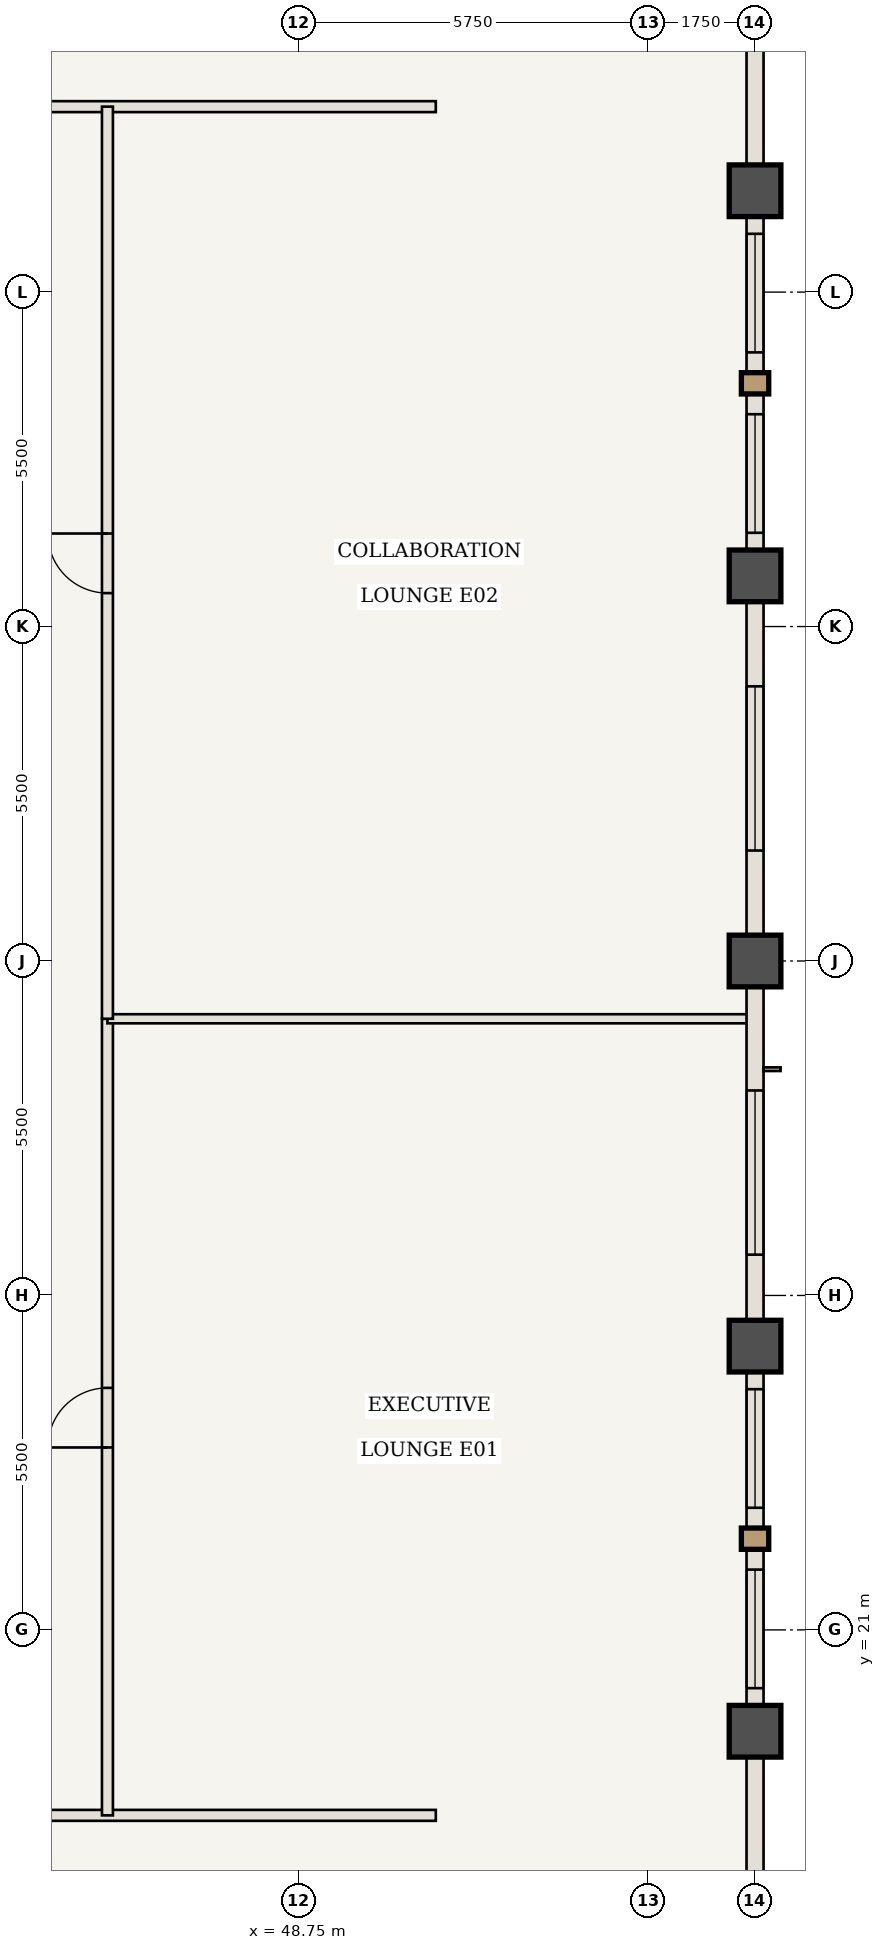
"""IFC4 building model, lengths in metres.
Left out: names, types, materials, properties, quantities, classifications, styles, units other than length and angle.
Written with IfcOpenShell. Run it as: python <this file> out.ifc"""

import sys

from ifc_helpers import new_model, si_unit, direction, frame, frame_2d, origin, origin_2d, place, context, subcontext, project, spatial, rectangle, extrude, element, fill, save


model = new_model("IFC4")
c1 = context("Model", 3, precision=1e-05, world=origin(), true_north=direction((0.0, 1.0)))
c2 = subcontext(c1, "Body", "Model", "MODEL_VIEW")
j1 = project(units=[si_unit("LENGTHUNIT", "METRE"), si_unit("PLANEANGLEUNIT", "RADIAN")], contexts=[c1])
p1 = place(None, origin())
s1 = spatial("IfcSite", under=j1, at=p1, CompositionType="ELEMENT")
p2 = place(p1, origin())
s2 = spatial("IfcBuilding", under=s1, at=p2, CompositionType="ELEMENT")
p3 = place(p2, frame((0.0, 0.0, 229.25)))
s3 = spatial("IfcBuildingStorey", under=s2, at=p3, CompositionType="ELEMENT", Elevation=229.25)
for number, where, z_axis, x_axis in (
    (1, (56.25, 19.333, 0.0), (0.0, 0.0, 1.0), (1.0, 0.0, 0.0)),
    (2, (56.25, 25.667, 0.0), (0.0, 0.0, 1.0), (1.0, 0.0, 0.0)),
    (3, (56.25, 32.0, 0.0), (0.0, 0.0, 1.0), (1.0, 0.0, 0.0)),
    (4, (56.25, 38.333, 0.0), (0.0, 0.0, 1.0), (1.0, 0.0, 0.0)),
    (5, (56.25, 44.667, 0.0), (0.0, 0.0, 1.0), (1.0, 0.0, 0.0)),
):
    element("IfcColumn", number, at=place(p3, frame(where, z_axis=z_axis, x_axis=x_axis)), inside=s3, PredefinedType="COLUMN", context=c2, shape_type="SweptSolid", body=[
        extrude(rectangle(XDim=0.85, YDim=0.85, at=origin_2d()), origin(), (0.0, 0.0, 1.0), 3.85),
    ])
p4 = place(p3, frame((39.258, 17.95, 0.0), z_axis=(0.0, 0.0, 1.0), x_axis=(1.0, 0.0, 0.0)))
e6 = element("IfcWall", 6, at=p4, inside=s3, PredefinedType="STANDARD", context=c2, shape_type="SweptSolid", body=[
    extrude(rectangle(XDim=11.742, YDim=0.18, at=frame_2d((5.871, 0.0))), origin(), (0.0, 0.0, 1.0), 3.685),
])
p5 = place(p4, frame((1.196, 0.0, 0.0)))
e7 = element("IfcOpeningElement", 7, at=p5, cuts=e6, PredefinedType="OPENING", context=c2, shape_type="SweptSolid", body=[
    extrude(rectangle(XDim=0.98, YDim=2.2, at=frame_2d((0.49, 1.1))), frame((0.0, 0.1, 0.0), z_axis=(0.0, -1.0, 0.0), x_axis=(1.0, 0.0, 0.0)), (0.0, 0.0, 1.0), 0.2),
])
p6 = place(p3, frame((13.0, 46.05, 0.0), z_axis=(0.0, 0.0, 1.0), x_axis=(1.0, 0.0, 0.0)))
e8 = element("IfcWall", 8, at=p6, inside=s3, PredefinedType="STANDARD", context=c2, shape_type="SweptSolid", body=[
    extrude(rectangle(XDim=38.0, YDim=0.18, at=frame_2d((19.0, 0.0))), origin(), (0.0, 0.0, 1.0), 3.685),
])
p7 = place(p6, frame((19.7, 0.0, 0.0)))
e9 = element("IfcOpeningElement", 9, at=p7, cuts=e8, PredefinedType="OPENING", context=c2, shape_type="SweptSolid", body=[
    extrude(rectangle(XDim=0.98, YDim=2.2, at=frame_2d((0.49, 1.1))), frame((0.0, 0.1, 0.0), z_axis=(0.0, -1.0, 0.0), x_axis=(1.0, 0.0, 0.0)), (0.0, 0.0, 1.0), 0.2),
])
p8 = place(p3, frame((45.6, 17.95, 0.0), z_axis=(0.0, 0.0, 1.0), x_axis=(0.0, 1.0, 0.0)))
e10 = element("IfcWall", 10, at=p8, inside=s3, PredefinedType="STANDARD", context=c2, shape_type="SweptSolid", body=[
    extrude(rectangle(XDim=13.1, YDim=0.18, at=frame_2d((6.55, 0.0))), origin(), (0.0, 0.0, 1.0), 3.685),
])
p9 = place(p8, frame((6.05, 0.0, 0.0)))
e11 = element("IfcOpeningElement", 11, at=p9, cuts=e10, PredefinedType="OPENING", context=c2, shape_type="SweptSolid", body=[
    extrude(rectangle(XDim=0.98, YDim=2.2, at=frame_2d((0.49, 1.1))), frame((0.0, 0.1, 0.0), z_axis=(0.0, -1.0, 0.0), x_axis=(1.0, 0.0, 0.0)), (0.0, 0.0, 1.0), 0.2),
])
p10 = place(p3, frame((45.6, 31.05, 0.0), z_axis=(0.0, 0.0, 1.0), x_axis=(1.0, 0.0, 0.0)))
e12 = element("IfcWall", 12, at=p10, inside=s3, PredefinedType="STANDARD", context=c2, shape_type="SweptSolid", body=[
    extrude(rectangle(XDim=10.59, YDim=0.15, at=frame_2d((5.295, 0.0))), origin(), (0.0, 0.0, 1.0), 3.685),
])
p11 = place(p3, frame((45.6, 31.05, 0.0), z_axis=(0.0, 0.0, 1.0), x_axis=(0.0, 1.0, 0.0)))
e13 = element("IfcWall", 13, at=p11, inside=s3, PredefinedType="STANDARD", context=c2, shape_type="SweptSolid", body=[
    extrude(rectangle(XDim=15.0, YDim=0.18, at=frame_2d((7.5, 0.0))), origin(), (0.0, 0.0, 1.0), 3.685),
])
p12 = place(p11, frame((7.0, 0.0, 0.0)))
e14 = element("IfcOpeningElement", 14, at=p12, cuts=e13, PredefinedType="OPENING", context=c2, shape_type="SweptSolid", body=[
    extrude(rectangle(XDim=0.98, YDim=2.2, at=frame_2d((0.49, 1.1))), frame((0.0, 0.1, 0.0), z_axis=(0.0, -1.0, 0.0), x_axis=(1.0, 0.0, 0.0)), (0.0, 0.0, 1.0), 0.2),
])
p13 = place(p3, frame((56.25, 19.333, 0.0), z_axis=(0.0, 0.0, 1.0), x_axis=(0.0, -1.0, 0.0)))
e15 = element("IfcWall", 15, at=p13, inside=s3, PredefinedType="USERDEFINED", context=c2, shape_type="SweptSolid", body=[
    extrude(rectangle(XDim=6.333, YDim=0.28, at=frame_2d((3.167, 0.0))), origin(), (0.0, 0.0, 1.0), 2.985),
])
p14 = place(p3, frame((56.25, 25.667, 0.0), z_axis=(0.0, 0.0, 1.0), x_axis=(0.0, -1.0, 0.0)))
e16 = element("IfcWall", 16, at=p14, inside=s3, PredefinedType="USERDEFINED", context=c2, shape_type="SweptSolid", body=[
    extrude(rectangle(XDim=6.333, YDim=0.28, at=frame_2d((3.167, 0.0))), origin(), (0.0, 0.0, 1.0), 2.985),
])
p15 = place(p14, frame((0.708, 0.0, 0.85)))
e17 = element("IfcOpeningElement", 17, at=p15, cuts=e16, PredefinedType="OPENING", context=c2, shape_type="SweptSolid", body=[
    extrude(rectangle(XDim=1.95, YDim=1.935, at=frame_2d((0.975, 0.968))), frame((0.0, 0.15, 0.0), z_axis=(0.0, -1.0, 0.0), x_axis=(1.0, 0.0, 0.0)), (0.0, 0.0, 1.0), 0.3),
])
p16 = place(p14, frame((3.675, 0.0, 0.85)))
e18 = element("IfcOpeningElement", 18, at=p16, cuts=e16, PredefinedType="OPENING", context=c2, shape_type="SweptSolid", body=[
    extrude(rectangle(XDim=1.95, YDim=1.935, at=frame_2d((0.975, 0.968))), frame((0.0, 0.15, 0.0), z_axis=(0.0, -1.0, 0.0), x_axis=(1.0, 0.0, 0.0)), (0.0, 0.0, 1.0), 0.3),
])
p17 = place(p3, frame((56.25, 32.0, 0.0), z_axis=(0.0, 0.0, 1.0), x_axis=(0.0, -1.0, 0.0)))
e19 = element("IfcWall", 19, at=p17, inside=s3, PredefinedType="USERDEFINED", context=c2, shape_type="SweptSolid", body=[
    extrude(rectangle(XDim=6.333, YDim=0.28, at=frame_2d((3.167, 0.0))), origin(), (0.0, 0.0, 1.0), 2.985),
])
p18 = place(p17, frame((2.129, 0.0, 0.85)))
e20 = element("IfcOpeningElement", 20, at=p18, cuts=e19, PredefinedType="OPENING", context=c2, shape_type="SweptSolid", body=[
    extrude(rectangle(XDim=2.7, YDim=1.935, at=frame_2d((1.35, 0.968))), frame((0.0, 0.15, 0.0), z_axis=(0.0, -1.0, 0.0), x_axis=(1.0, 0.0, 0.0)), (0.0, 0.0, 1.0), 0.3),
])
p19 = place(p3, frame((56.25, 38.333, 0.0), z_axis=(0.0, 0.0, 1.0), x_axis=(0.0, -1.0, 0.0)))
e21 = element("IfcWall", 21, at=p19, inside=s3, PredefinedType="USERDEFINED", context=c2, shape_type="SweptSolid", body=[
    extrude(rectangle(XDim=6.333, YDim=0.28, at=frame_2d((3.167, 0.0))), origin(), (0.0, 0.0, 1.0), 2.985),
])
p20 = place(p19, frame((1.817, 0.0, 0.85)))
e22 = element("IfcOpeningElement", 22, at=p20, cuts=e21, PredefinedType="OPENING", context=c2, shape_type="SweptSolid", body=[
    extrude(rectangle(XDim=2.7, YDim=1.935, at=frame_2d((1.35, 0.968))), frame((0.0, 0.15, 0.0), z_axis=(0.0, -1.0, 0.0), x_axis=(1.0, 0.0, 0.0)), (0.0, 0.0, 1.0), 0.3),
])
p21 = place(p3, frame((56.25, 44.667, 0.0), z_axis=(0.0, 0.0, 1.0), x_axis=(0.0, -1.0, 0.0)))
e23 = element("IfcWall", 23, at=p21, inside=s3, PredefinedType="USERDEFINED", context=c2, shape_type="SweptSolid", body=[
    extrude(rectangle(XDim=6.333, YDim=0.28, at=frame_2d((3.167, 0.0))), origin(), (0.0, 0.0, 1.0), 2.985),
])
p22 = place(p21, frame((0.708, 0.0, 0.85)))
e24 = element("IfcOpeningElement", 24, at=p22, cuts=e23, PredefinedType="OPENING", context=c2, shape_type="SweptSolid", body=[
    extrude(rectangle(XDim=1.95, YDim=1.935, at=frame_2d((0.975, 0.968))), frame((0.0, 0.15, 0.0), z_axis=(0.0, -1.0, 0.0), x_axis=(1.0, 0.0, 0.0)), (0.0, 0.0, 1.0), 0.3),
])
p23 = place(p21, frame((3.675, 0.0, 0.85)))
e25 = element("IfcOpeningElement", 25, at=p23, cuts=e23, PredefinedType="OPENING", context=c2, shape_type="SweptSolid", body=[
    extrude(rectangle(XDim=1.95, YDim=1.935, at=frame_2d((0.975, 0.968))), frame((0.0, 0.15, 0.0), z_axis=(0.0, -1.0, 0.0), x_axis=(1.0, 0.0, 0.0)), (0.0, 0.0, 1.0), 0.3),
])
p24 = place(p3, frame((56.25, 51.0, 0.0), z_axis=(0.0, 0.0, 1.0), x_axis=(0.0, -1.0, 0.0)))
e26 = element("IfcWall", 26, at=p24, inside=s3, PredefinedType="USERDEFINED", context=c2, shape_type="SweptSolid", body=[
    extrude(rectangle(XDim=6.333, YDim=0.28, at=frame_2d((3.167, 0.0))), origin(), (0.0, 0.0, 1.0), 2.985),
])
p25 = place(p9, origin())
e27 = element("IfcDoor", 27, at=p25, inside=s3, OperationType="SINGLE_SWING_LEFT", PredefinedType="DOOR", context=c2, shape_type="SweptSolid", body=[
    extrude(rectangle(XDim=0.98, YDim=2.2, at=frame_2d((0.49, 1.1))), frame((0.0, 0.025, 0.0), z_axis=(0.0, -1.0, 0.0), x_axis=(1.0, 0.0, 0.0)), (0.0, 0.0, 1.0), 0.05),
])
fill(e11, e27)
p26 = place(p12, origin())
e28 = element("IfcDoor", 28, at=p26, inside=s3, OperationType="SINGLE_SWING_RIGHT", PredefinedType="DOOR", context=c2, shape_type="SweptSolid", body=[
    extrude(rectangle(XDim=0.98, YDim=2.2, at=frame_2d((0.49, 1.1))), frame((0.0, 0.025, 0.0), z_axis=(0.0, -1.0, 0.0), x_axis=(1.0, 0.0, 0.0)), (0.0, 0.0, 1.0), 0.05),
])
fill(e14, e28)
p27 = place(p15, origin())
e29 = element("IfcWindow", 29, at=p27, inside=s3, PartitioningType="SINGLE_PANEL", PredefinedType="WINDOW", context=c2, shape_type="SweptSolid", body=[
    extrude(rectangle(XDim=1.95, YDim=1.935, at=frame_2d((0.975, 0.968))), frame((0.0, 0.03, 0.0), z_axis=(0.0, -1.0, 0.0), x_axis=(1.0, 0.0, 0.0)), (0.0, 0.0, 1.0), 0.06),
])
fill(e17, e29)
p28 = place(p16, origin())
e30 = element("IfcWindow", 30, at=p28, inside=s3, PartitioningType="SINGLE_PANEL", PredefinedType="WINDOW", context=c2, shape_type="SweptSolid", body=[
    extrude(rectangle(XDim=1.95, YDim=1.935, at=frame_2d((0.975, 0.968))), frame((0.0, 0.03, 0.0), z_axis=(0.0, -1.0, 0.0), x_axis=(1.0, 0.0, 0.0)), (0.0, 0.0, 1.0), 0.06),
])
fill(e18, e30)
p29 = place(p18, origin())
e31 = element("IfcWindow", 31, at=p29, inside=s3, PartitioningType="SINGLE_PANEL", PredefinedType="WINDOW", context=c2, shape_type="SweptSolid", body=[
    extrude(rectangle(XDim=2.7, YDim=1.935, at=frame_2d((1.35, 0.968))), frame((0.0, 0.03, 0.0), z_axis=(0.0, -1.0, 0.0), x_axis=(1.0, 0.0, 0.0)), (0.0, 0.0, 1.0), 0.06),
])
fill(e20, e31)
p30 = place(p20, origin())
e32 = element("IfcWindow", 32, at=p30, inside=s3, PartitioningType="SINGLE_PANEL", PredefinedType="WINDOW", context=c2, shape_type="SweptSolid", body=[
    extrude(rectangle(XDim=2.7, YDim=1.935, at=frame_2d((1.35, 0.968))), frame((0.0, 0.03, 0.0), z_axis=(0.0, -1.0, 0.0), x_axis=(1.0, 0.0, 0.0)), (0.0, 0.0, 1.0), 0.06),
])
fill(e22, e32)
p31 = place(p22, origin())
e33 = element("IfcWindow", 33, at=p31, inside=s3, PartitioningType="SINGLE_PANEL", PredefinedType="WINDOW", context=c2, shape_type="SweptSolid", body=[
    extrude(rectangle(XDim=1.95, YDim=1.935, at=frame_2d((0.975, 0.968))), frame((0.0, 0.03, 0.0), z_axis=(0.0, -1.0, 0.0), x_axis=(1.0, 0.0, 0.0)), (0.0, 0.0, 1.0), 0.06),
])
fill(e24, e33)
p32 = place(p23, origin())
e34 = element("IfcWindow", 34, at=p32, inside=s3, PartitioningType="SINGLE_PANEL", PredefinedType="WINDOW", context=c2, shape_type="SweptSolid", body=[
    extrude(rectangle(XDim=1.95, YDim=1.935, at=frame_2d((0.975, 0.968))), frame((0.0, 0.03, 0.0), z_axis=(0.0, -1.0, 0.0), x_axis=(1.0, 0.0, 0.0)), (0.0, 0.0, 1.0), 0.06),
])
fill(e25, e34)
save(model, sys.argv[1])
